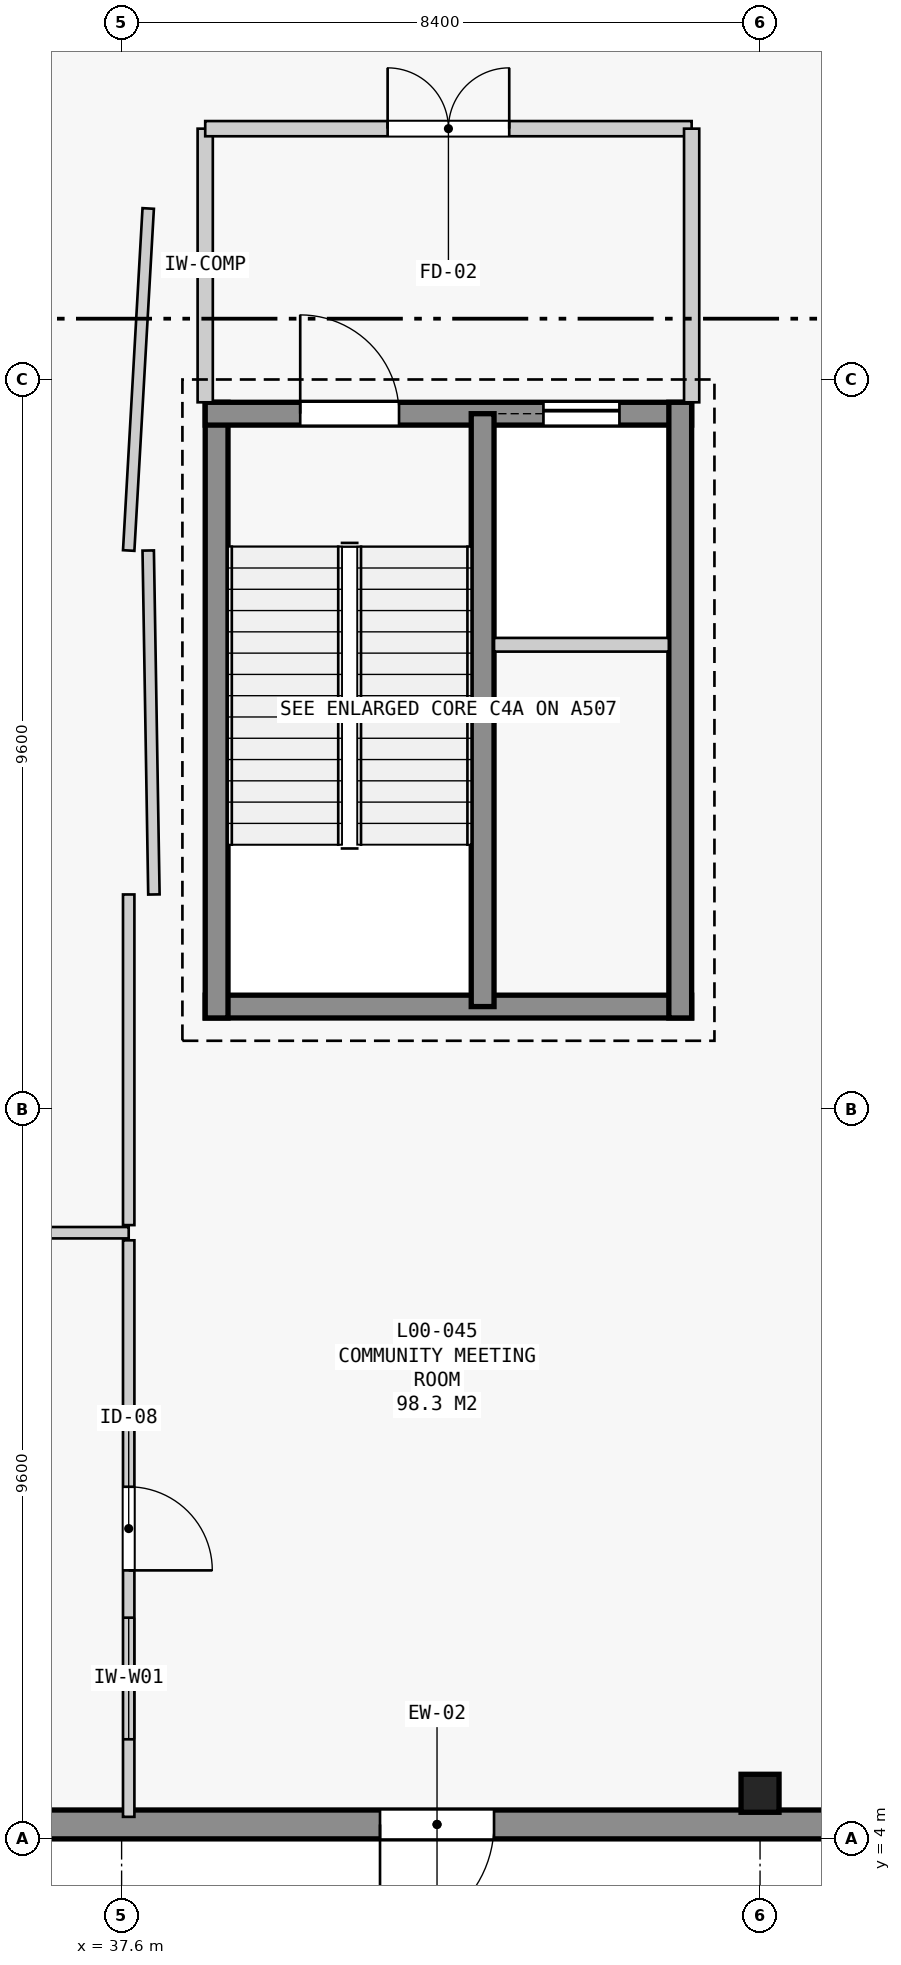
"""IFC4 building model, lengths in metres.
Left out: names, types, materials, properties, quantities, classifications, styles, units other than length and angle.
Written with IfcOpenShell. Run it as: python <this file> out.ifc"""

import sys

from ifc_helpers import new_model, si_unit, direction, frame, frame_2d, origin, origin_2d, place, context, subcontext, project, spatial, rectangle, extrude, element, fill, save


model = new_model("IFC4")
c1 = context("Model", 3, precision=1e-05, world=origin(), true_north=direction((0.0, 1.0)))
c2 = subcontext(c1, "Body", "Model", "MODEL_VIEW")
j1 = project(units=[si_unit("LENGTHUNIT", "METRE"), si_unit("PLANEANGLEUNIT", "RADIAN")], contexts=[c1])
p1 = place(None, origin())
s1 = spatial("IfcSite", under=j1, at=p1, CompositionType="ELEMENT")
p2 = place(p1, origin())
s2 = spatial("IfcBuilding", under=s1, at=p2, CompositionType="ELEMENT")
p3 = place(p2, origin())
s3 = spatial("IfcBuildingStorey", under=s2, at=p3, CompositionType="ELEMENT", Elevation=0.0)
p4 = place(p3, frame((46.0, 4.6, 0.0), z_axis=(0.0, 0.0, 1.0), x_axis=(1.0, 0.0, 0.0)))
e1 = element("IfcColumn", 1, at=p4, inside=s3, PredefinedType="COLUMN", context=c2, shape_type="SweptSolid", body=[
    extrude(rectangle(XDim=0.5, YDim=0.5, at=origin_2d()), origin(), (0.0, 0.0, 1.0), 5.4),
])
p5 = place(p3, frame((54.11, 4.19, 0.0), z_axis=(0.0, 0.0, 1.0), x_axis=(-1.0, 0.0, 0.0)))
e2 = element("IfcWall", 2, at=p5, inside=s3, PredefinedType="STANDARD", context=c2, shape_type="SweptSolid", body=[
    extrude(rectangle(XDim=24.72, YDim=0.38, at=frame_2d((12.36, 0.0))), origin(), (0.0, 0.0, 1.0), 5.14),
])
p6 = place(p5, frame((11.61, 0.0, 0.0)))
e3 = element("IfcOpeningElement", 3, at=p6, cuts=e2, PredefinedType="OPENING", context=c2, shape_type="SweptSolid", body=[
    extrude(rectangle(XDim=1.5, YDim=2.3, at=frame_2d((0.75, 1.15))), frame((0.0, 0.2, 0.0), z_axis=(0.0, -1.0, 0.0), x_axis=(1.0, 0.0, 0.0)), (0.0, 0.0, 1.0), 0.4),
])
p7 = place(p3, frame((45.1, 14.95, 0.0), z_axis=(0.0, 0.0, 1.0), x_axis=(-1.0, 0.0, 0.0)))
e4 = element("IfcWall", 4, at=p7, inside=s3, PredefinedType="SHEAR", context=c2, shape_type="SweptSolid", body=[
    extrude(rectangle(XDim=6.4, YDim=0.3, at=frame_2d((3.2, 0.0))), origin(), (0.0, 0.0, 1.0), 5.14),
])
p8 = place(p3, frame((38.85, 14.8, 0.0), z_axis=(0.0, 0.0, 1.0), x_axis=(0.0, 1.0, 0.0)))
e5 = element("IfcWall", 5, at=p8, inside=s3, PredefinedType="SHEAR", context=c2, shape_type="SweptSolid", body=[
    extrude(rectangle(XDim=8.1, YDim=0.3, at=frame_2d((4.05, 0.0))), origin(), (0.0, 0.0, 1.0), 5.14),
])
p9 = place(p3, frame((38.7, 22.75, 0.0), z_axis=(0.0, 0.0, 1.0), x_axis=(1.0, 0.0, 0.0)))
e6 = element("IfcWall", 6, at=p9, inside=s3, PredefinedType="SHEAR", context=c2, shape_type="SweptSolid", body=[
    extrude(rectangle(XDim=6.4, YDim=0.3, at=frame_2d((3.2, 0.0))), origin(), (0.0, 0.0, 1.0), 5.14),
])
p10 = place(p9, frame((1.25, 0.0, 0.0)))
e7 = element("IfcOpeningElement", 7, at=p10, cuts=e6, PredefinedType="OPENING", context=c2, shape_type="SweptSolid", body=[
    extrude(rectangle(XDim=1.3, YDim=2.2, at=frame_2d((0.65, 1.1))), frame((0.0, 0.16, 0.0), z_axis=(0.0, -1.0, 0.0), x_axis=(1.0, 0.0, 0.0)), (0.0, 0.0, 1.0), 0.32),
])
p11 = place(p9, frame((4.45, 0.0, 0.0)))
e8 = element("IfcOpeningElement", 8, at=p11, cuts=e6, PredefinedType="OPENING", context=c2, shape_type="SweptSolid", body=[
    extrude(rectangle(XDim=1.0, YDim=2.15, at=frame_2d((0.5, 1.075))), frame((0.0, 0.16, 0.0), z_axis=(0.0, -1.0, 0.0), x_axis=(1.0, 0.0, 0.0)), (0.0, 0.0, 1.0), 0.32),
])
p12 = place(p3, frame((44.95, 22.9, 0.0), z_axis=(0.0, 0.0, 1.0), x_axis=(0.0, -1.0, 0.0)))
e9 = element("IfcWall", 9, at=p12, inside=s3, PredefinedType="SHEAR", context=c2, shape_type="SweptSolid", body=[
    extrude(rectangle(XDim=8.1, YDim=0.3, at=frame_2d((4.05, 0.0))), origin(), (0.0, 0.0, 1.0), 5.14),
])
p13 = place(p3, frame((42.35, 14.95, 0.0), z_axis=(0.0, 0.0, 1.0), x_axis=(0.0, 1.0, 0.0)))
e10 = element("IfcWall", 10, at=p13, inside=s3, PredefinedType="SHEAR", context=c2, shape_type="SweptSolid", body=[
    extrude(rectangle(XDim=7.8, YDim=0.3, at=frame_2d((3.9, 0.0))), origin(), (0.0, 0.0, 1.0), 5.14),
])
p14 = place(p3, frame((42.5, 19.71, 0.0), z_axis=(0.0, 0.0, 1.0), x_axis=(1.0, 0.0, 0.0)))
e11 = element("IfcWall", 11, at=p14, inside=s3, PredefinedType="PARTITIONING", context=c2, shape_type="SweptSolid", body=[
    extrude(rectangle(XDim=2.3, YDim=0.18, at=frame_2d((1.15, 0.0))), origin(), (0.0, 0.0, 1.0), 5.14),
])
p15 = place(p3, frame((38.7, 22.9, 0.0), z_axis=(0.0, 0.0, 1.0), x_axis=(0.0, 1.0, 0.0)))
e12 = element("IfcWall", 12, at=p15, inside=s3, PredefinedType="STANDARD", context=c2, shape_type="SweptSolid", body=[
    extrude(rectangle(XDim=3.6, YDim=0.2, at=frame_2d((1.8, 0.0))), origin(), (0.0, 0.0, 1.0), 4.37),
])
p16 = place(p3, frame((38.7, 26.5, 0.0), z_axis=(0.0, 0.0, 1.0), x_axis=(1.0, 0.0, 0.0)))
e13 = element("IfcWall", 13, at=p16, inside=s3, PredefinedType="STANDARD", context=c2, shape_type="SweptSolid", body=[
    extrude(rectangle(XDim=6.4, YDim=0.2, at=frame_2d((3.2, 0.0))), origin(), (0.0, 0.0, 1.0), 4.67),
])
p17 = place(p16, frame((2.4, 0.0, 0.0)))
e14 = element("IfcOpeningElement", 14, at=p17, cuts=e13, PredefinedType="OPENING", context=c2, shape_type="SweptSolid", body=[
    extrude(rectangle(XDim=1.6, YDim=2.2, at=frame_2d((0.8, 1.1))), frame((0.0, 0.11, 0.0), z_axis=(0.0, -1.0, 0.0), x_axis=(1.0, 0.0, 0.0)), (0.0, 0.0, 1.0), 0.22),
])
p18 = place(p3, frame((45.1, 26.5, 0.0), z_axis=(0.0, 0.0, 1.0), x_axis=(0.0, -1.0, 0.0)))
e15 = element("IfcWall", 15, at=p18, inside=s3, PredefinedType="STANDARD", context=c2, shape_type="SweptSolid", body=[
    extrude(rectangle(XDim=3.6, YDim=0.2, at=frame_2d((1.8, 0.0))), origin(), (0.0, 0.0, 1.0), 4.37),
])
p19 = place(p3, frame((33.675, 11.975, 0.0), z_axis=(0.0, 0.0, 1.0), x_axis=(1.0, 0.0, 0.0)))
e16 = element("IfcWall", 16, at=p19, inside=s3, PredefinedType="PARTITIONING", context=c2, shape_type="SweptSolid", body=[
    extrude(rectangle(XDim=4.018, YDim=0.15, at=frame_2d((2.009, 0.0))), origin(), (0.0, 0.0, 1.0), 4.47),
])
p20 = place(p3, frame((37.693, 11.875, 0.0), z_axis=(0.0, 0.0, 1.0), x_axis=(0.0, -1.0, 0.0)))
e17 = element("IfcWall", 17, at=p20, inside=s3, PredefinedType="PARTITIONING", context=c2, shape_type="SweptSolid", body=[
    extrude(rectangle(XDim=7.585, YDim=0.15, at=frame_2d((3.792, 0.0))), origin(), (0.0, 0.0, 1.0), 4.42),
])
p21 = place(p20, frame((3.242, 0.0, 0.0)))
e18 = element("IfcOpeningElement", 18, at=p21, cuts=e17, PredefinedType="OPENING", context=c2, shape_type="SweptSolid", body=[
    extrude(rectangle(XDim=1.1, YDim=2.2, at=frame_2d((0.55, 1.1))), frame((0.0, 0.085, 0.0), z_axis=(0.0, -1.0, 0.0), x_axis=(1.0, 0.0, 0.0)), (0.0, 0.0, 1.0), 0.17),
])
p22 = place(p20, frame((4.965, 0.0, 1.05)))
e19 = element("IfcOpeningElement", 19, at=p22, cuts=e17, PredefinedType="OPENING", context=c2, shape_type="SweptSolid", body=[
    extrude(rectangle(XDim=1.6, YDim=1.5, at=frame_2d((0.8, 0.75))), frame((0.0, 0.085, 0.0), z_axis=(0.0, -1.0, 0.0), x_axis=(1.0, 0.0, 0.0)), (0.0, 0.0, 1.0), 0.17),
])
p23 = place(p3, frame((37.693, 12.075, 0.0), z_axis=(0.0, 0.0, 1.0), x_axis=(0.0, 1.0, 0.0)))
e20 = element("IfcWall", 20, at=p23, inside=s3, PredefinedType="PARTITIONING", context=c2, shape_type="SweptSolid", body=[
    extrude(rectangle(XDim=4.35, YDim=0.15, at=frame_2d((2.175, 0.0))), origin(), (0.0, 0.0, 1.0), 4.32),
])
p24 = place(p3, frame((38.025, 16.425, 0.0), z_axis=(0.0, 0.0, 1.0), x_axis=(-0.016561880473, 0.999862842652, 0.0)))
e21 = element("IfcWall", 21, at=p24, inside=s3, PredefinedType="PARTITIONING", context=c2, shape_type="SweptSolid", body=[
    extrude(rectangle(XDim=4.526, YDim=0.15, at=frame_2d((2.263, 0.0))), origin(), (0.0, 0.0, 1.0), 5.14),
])
p25 = place(p3, frame((37.693, 20.95, 0.0), z_axis=(0.0, 0.0, 1.0), x_axis=(0.056927928782, 0.998378290491, 0.0)))
e22 = element("IfcWall", 22, at=p25, inside=s3, PredefinedType="PARTITIONING", context=c2, shape_type="SweptSolid", body=[
    extrude(rectangle(XDim=4.507, YDim=0.15, at=frame_2d((2.254, 0.0))), origin(), (0.0, 0.0, 1.0), 4.37),
])
p26 = place(p6, origin())
e23 = element("IfcDoor", 23, at=p26, inside=s3, OperationType="SINGLE_SWING_RIGHT", PredefinedType="DOOR", context=c2, shape_type="SweptSolid", body=[
    extrude(rectangle(XDim=1.5, YDim=2.3, at=frame_2d((0.75, 1.15))), frame((0.0, 0.025, 0.0), z_axis=(0.0, -1.0, 0.0), x_axis=(1.0, 0.0, 0.0)), (0.0, 0.0, 1.0), 0.05),
])
fill(e3, e23)
p27 = place(p10, origin())
e24 = element("IfcDoor", 24, at=p27, inside=s3, OperationType="SINGLE_SWING_LEFT", PredefinedType="DOOR", context=c2, shape_type="SweptSolid", body=[
    extrude(rectangle(XDim=1.3, YDim=2.2, at=frame_2d((0.65, 1.1))), frame((0.0, 0.025, 0.0), z_axis=(0.0, -1.0, 0.0), x_axis=(1.0, 0.0, 0.0)), (0.0, 0.0, 1.0), 0.05),
])
fill(e7, e24)
p28 = place(p11, origin())
e25 = element("IfcDoor", 25, at=p28, inside=s3, OperationType="SLIDING_TO_LEFT", PredefinedType="DOOR", context=c2, shape_type="SweptSolid", body=[
    extrude(rectangle(XDim=1.0, YDim=2.15, at=frame_2d((0.5, 1.075))), frame((0.0, 0.025, 0.0), z_axis=(0.0, -1.0, 0.0), x_axis=(1.0, 0.0, 0.0)), (0.0, 0.0, 1.0), 0.05),
])
fill(e8, e25)
p29 = place(p17, origin())
e26 = element("IfcDoor", 26, at=p29, inside=s3, OperationType="DOUBLE_DOOR_SINGLE_SWING", PredefinedType="DOOR", context=c2, shape_type="SweptSolid", body=[
    extrude(rectangle(XDim=1.6, YDim=2.2, at=frame_2d((0.8, 1.1))), frame((0.0, 0.025, 0.0), z_axis=(0.0, -1.0, 0.0), x_axis=(1.0, 0.0, 0.0)), (0.0, 0.0, 1.0), 0.05),
])
fill(e14, e26)
p30 = place(p21, origin())
e27 = element("IfcDoor", 27, at=p30, inside=s3, OperationType="SINGLE_SWING_RIGHT", PredefinedType="DOOR", context=c2, shape_type="SweptSolid", body=[
    extrude(rectangle(XDim=1.1, YDim=2.2, at=frame_2d((0.55, 1.1))), frame((0.0, 0.025, 0.0), z_axis=(0.0, -1.0, 0.0), x_axis=(1.0, 0.0, 0.0)), (0.0, 0.0, 1.0), 0.05),
])
fill(e18, e27)
p31 = place(p22, origin())
e28 = element("IfcWindow", 28, at=p31, inside=s3, PartitioningType="SINGLE_PANEL", PredefinedType="WINDOW", context=c2, shape_type="SweptSolid", body=[
    extrude(rectangle(XDim=1.6, YDim=1.5, at=frame_2d((0.8, 0.75))), frame((0.0, 0.03, 0.0), z_axis=(0.0, -1.0, 0.0), x_axis=(1.0, 0.0, 0.0)), (0.0, 0.0, 1.0), 0.06),
])
fill(e19, e28)
save(model, sys.argv[1])
